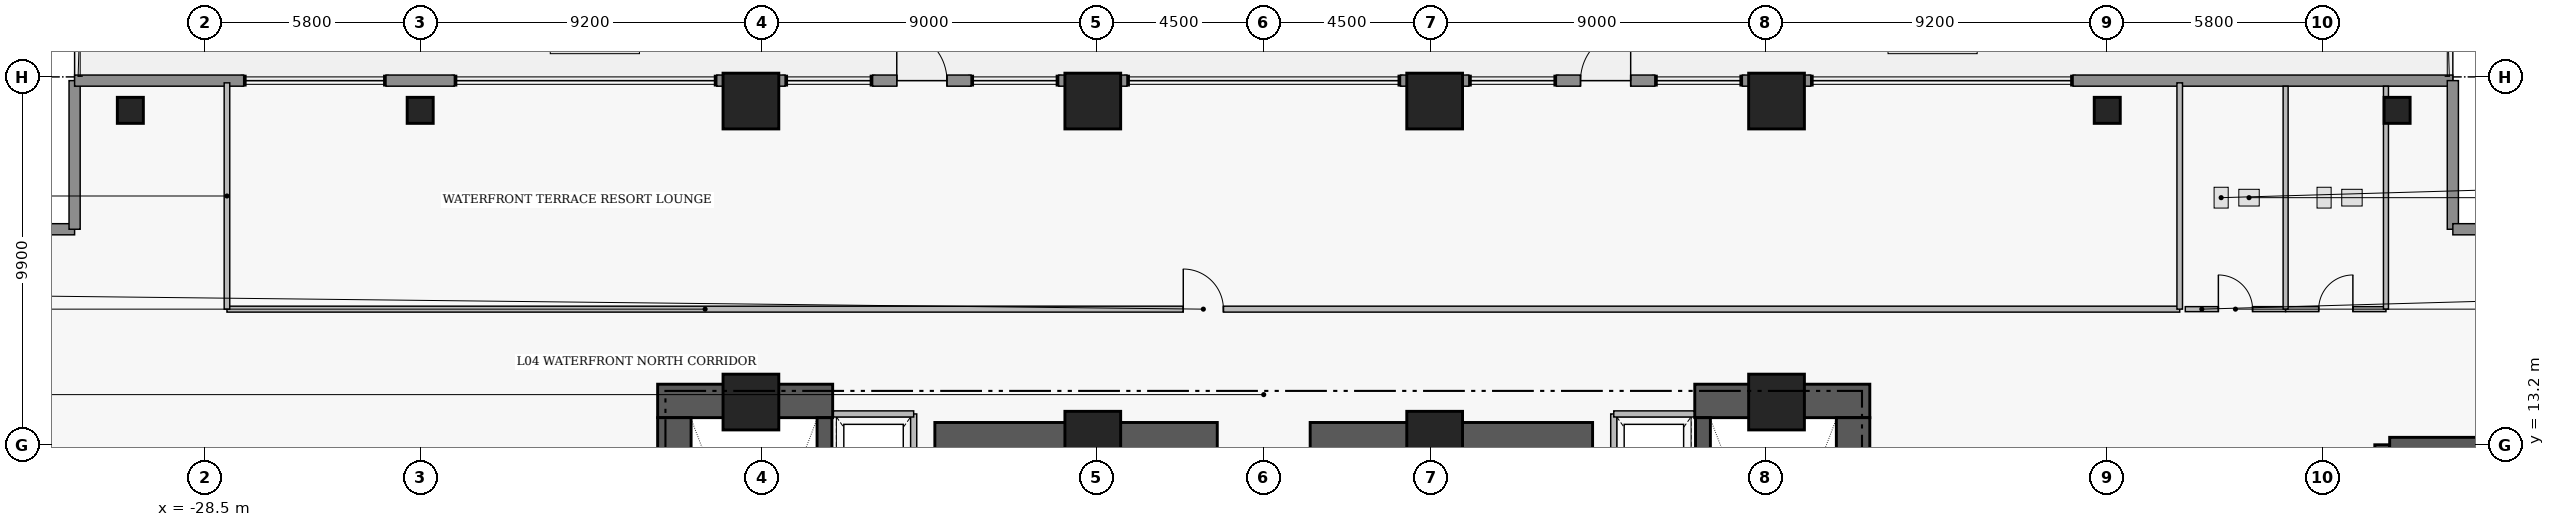
"""IFC4 building model, lengths in metres.
Left out: names, types, materials, properties, quantities, classifications, styles, units other than length and angle.
Written with IfcOpenShell. Run it as: python <this file> out.ifc"""

import sys

from ifc_helpers import new_model, si_unit, direction, frame, frame_2d, origin, origin_2d, place, context, subcontext, project, spatial, rectangle, extrude, element, fill, save


model = new_model("IFC4")
c1 = context("Model", 3, precision=1e-05, world=origin(), true_north=direction((0.0, 1.0)))
c2 = subcontext(c1, "Body", "Model", "MODEL_VIEW")
j1 = project(units=[si_unit("LENGTHUNIT", "METRE"), si_unit("PLANEANGLEUNIT", "RADIAN")], contexts=[c1])
p1 = place(None, origin())
s1 = spatial("IfcSite", under=j1, at=p1, CompositionType="ELEMENT")
p2 = place(p1, origin())
s2 = spatial("IfcBuilding", under=s1, at=p2, CompositionType="ELEMENT")
p3 = place(p2, frame((0.0, 0.0, 22.8)))
s3 = spatial("IfcBuildingStorey", under=s2, at=p3, CompositionType="ELEMENT", Elevation=22.8)
for number, where, z_axis, x_axis in (
    (1, (-16.31, 14.38, 0.0), (0.0, 0.0, 1.0), (1.0, 0.0, 0.0)),
    (2, (11.6, 14.38, 0.0), (0.0, 0.0, 1.0), (1.0, 0.0, 0.0)),
):
    element("IfcWall", number, at=place(p3, frame(where, z_axis=z_axis, x_axis=x_axis)), inside=s3, PredefinedType="SHEAR", context=c2, shape_type="SweptSolid", body=[
        extrude(rectangle(XDim=4.71, YDim=0.9, at=frame_2d((2.355, 0.0))), origin(), (0.0, 0.0, 1.0), 4.61),
    ])
for number, where, z_axis, x_axis in (
    (3, (-15.86, 4.97, 0.0), (0.0, 0.0, 1.0), (0.0, 1.0, 0.0)),
    (4, (15.86, 4.97, 0.0), (0.0, 0.0, 1.0), (0.0, 1.0, 0.0)),
):
    element("IfcWall", number, at=place(p3, frame(where, z_axis=z_axis, x_axis=x_axis)), inside=s3, PredefinedType="SHEAR", context=c2, shape_type="SweptSolid", body=[
        extrude(rectangle(XDim=8.96, YDim=0.9, at=frame_2d((4.48, 0.0))), origin(), (0.0, 0.0, 1.0), 4.61),
    ])
for number, where, z_axis, x_axis in (
    (5, (-8.85, 13.35, 0.0), (0.0, 0.0, 1.0), (1.0, 0.0, 0.0)),
    (6, (1.25, 13.35, 0.0), (0.0, 0.0, 1.0), (1.0, 0.0, 0.0)),
):
    element("IfcWall", number, at=place(p3, frame(where, z_axis=z_axis, x_axis=x_axis)), inside=s3, PredefinedType="SHEAR", context=c2, shape_type="SweptSolid", body=[
        extrude(rectangle(XDim=7.6, YDim=0.9, at=frame_2d((3.8, 0.0))), origin(), (0.0, 0.0, 1.0), 4.58),
    ])
p4 = place(p3, frame((-11.82, 4.97, 0.0), z_axis=(0.0, 0.0, 1.0), x_axis=(0.0, 1.0, 0.0)))
e7 = element("IfcWall", 7, at=p4, inside=s3, PredefinedType="SHEAR", context=c2, shape_type="SweptSolid", body=[
    extrude(rectangle(XDim=8.96, YDim=0.4, at=frame_2d((4.48, 0.0))), origin(), (0.0, 0.0, 1.0), 4.61),
])
p5 = place(p4, frame((0.31, 0.0, 0.0)))
e8 = element("IfcOpeningElement", 8, at=p5, cuts=e7, PredefinedType="OPENING", context=c2, shape_type="SweptSolid", body=[
    extrude(rectangle(XDim=1.12, YDim=2.22, at=frame_2d((0.56, 1.11))), frame((0.0, 0.21, 0.0), z_axis=(0.0, -1.0, 0.0), x_axis=(1.0, 0.0, 0.0)), (0.0, 0.0, 1.0), 0.42),
])
p6 = place(p3, frame((11.82, 13.93, 0.0), z_axis=(0.0, 0.0, 1.0), x_axis=(0.0, -1.0, 0.0)))
e9 = element("IfcWall", 9, at=p6, inside=s3, PredefinedType="SHEAR", context=c2, shape_type="SweptSolid", body=[
    extrude(rectangle(XDim=8.96, YDim=0.4, at=frame_2d((4.48, 0.0))), origin(), (0.0, 0.0, 1.0), 4.61),
])
p7 = place(p6, frame((7.53, 0.0, 0.0)))
e10 = element("IfcOpeningElement", 10, at=p7, cuts=e9, PredefinedType="OPENING", context=c2, shape_type="SweptSolid", body=[
    extrude(rectangle(XDim=1.12, YDim=2.22, at=frame_2d((0.56, 1.11))), frame((0.0, 0.21, 0.0), z_axis=(0.0, -1.0, 0.0), x_axis=(1.0, 0.0, 0.0)), (0.0, 0.0, 1.0), 0.42),
])
p8 = place(p3, frame((30.1, 13.2, 0.0), z_axis=(0.0, 0.0, 1.0), x_axis=(0.0, -1.0, 0.0)))
e11 = element("IfcWall", 11, at=p8, inside=s3, PredefinedType="SHEAR", context=c2, shape_type="SweptSolid", body=[
    extrude(rectangle(XDim=11.8, YDim=0.4, at=frame_2d((5.9, 0.0))), origin(), (0.0, 0.0, 1.0), 4.61),
])
p9 = place(p8, frame((9.7, 0.0, 0.0)))
e12 = element("IfcOpeningElement", 12, at=p9, cuts=e11, PredefinedType="OPENING", context=c2, shape_type="SweptSolid", body=[
    extrude(rectangle(XDim=1.12, YDim=2.22, at=frame_2d((0.56, 1.11))), frame((0.0, 0.21, 0.0), z_axis=(0.0, -1.0, 0.0), x_axis=(1.0, 0.0, 0.0)), (0.0, 0.0, 1.0), 0.42),
])
p10 = place(p3, frame((30.3, 13.2, 0.0), z_axis=(0.0, 0.0, 1.0), x_axis=(1.0, 0.0, 0.0)))
e13 = element("IfcWall", 13, at=p10, inside=s3, PredefinedType="SHEAR", context=c2, shape_type="SweptSolid", body=[
    extrude(rectangle(XDim=5.35, YDim=0.4, at=frame_2d((2.675, 0.0))), origin(), (0.0, 0.0, 1.0), 4.61),
])
for number, where, z_axis, x_axis in (
    (14, (-13.8, 14.35, 0.0), (0.0, 0.0, 1.0), (1.0, 0.0, 0.0)),
    (15, (-4.6, 13.35, 0.0), (0.0, 0.0, 1.0), (1.0, 0.0, 0.0)),
    (16, (4.6, 13.35, 0.0), (0.0, 0.0, 1.0), (1.0, 0.0, 0.0)),
    (17, (13.8, 14.35, 0.0), (0.0, 0.0, 1.0), (1.0, 0.0, 0.0)),
    (18, (-13.8, 22.45, 0.0), (0.0, 0.0, 1.0), (1.0, 0.0, 0.0)),
    (19, (-4.6, 22.45, 0.0), (0.0, 0.0, 1.0), (1.0, 0.0, 0.0)),
    (20, (4.6, 22.45, 0.0), (0.0, 0.0, 1.0), (1.0, 0.0, 0.0)),
    (21, (13.8, 22.45, 0.0), (0.0, 0.0, 1.0), (1.0, 0.0, 0.0)),
):
    element("IfcColumn", number, at=place(p3, frame(where, z_axis=z_axis, x_axis=x_axis)), inside=s3, PredefinedType="COLUMN", context=c2, shape_type="SweptSolid", body=[
        extrude(rectangle(XDim=1.5, YDim=1.5, at=origin_2d()), origin(), (0.0, 0.0, 1.0), 4.8),
    ])
for number, where, z_axis, x_axis in (
    (22, (-30.5, 22.2, 0.0), (0.0, 0.0, 1.0), (1.0, 0.0, 0.0)),
    (23, (30.5, 22.2, 0.0), (0.0, 0.0, 1.0), (1.0, 0.0, 0.0)),
    (24, (-22.7, 22.2, 0.0), (0.0, 0.0, 1.0), (1.0, 0.0, 0.0)),
    (25, (22.7, 22.2, 0.0), (0.0, 0.0, 1.0), (1.0, 0.0, 0.0)),
):
    element("IfcColumn", number, at=place(p3, frame(where, z_axis=z_axis, x_axis=x_axis)), inside=s3, PredefinedType="COLUMN", context=c2, shape_type="SweptSolid", body=[
        extrude(rectangle(XDim=0.7, YDim=0.7, at=origin_2d()), origin(), (0.0, 0.0, 1.0), 4.8),
    ])
for number, where, z_axis, x_axis in (
    (26, (-36.0, 19.0, 0.0), (0.0, 0.0, 1.0), (1.0, 0.0, 0.0)),
    (27, (-32.0, 19.0, 0.0), (0.0, 0.0, 1.0), (0.0, 1.0, 0.0)),
):
    element("IfcWall", number, at=place(p3, frame(where, z_axis=z_axis, x_axis=x_axis)), inside=s3, PredefinedType="STANDARD", context=c2, shape_type="SweptSolid", body=[
        extrude(rectangle(XDim=4.0, YDim=0.3, at=frame_2d((2.0, 0.0))), origin(), (0.0, 0.0, 1.0), 4.58),
    ])
p11 = place(p3, frame((-32.0, 23.0, 0.0), z_axis=(0.0, 0.0, 1.0), x_axis=(1.0, 0.0, 0.0)))
e28 = element("IfcWall", 28, at=p11, inside=s3, PredefinedType="STANDARD", context=c2, shape_type="SweptSolid", body=[
    extrude(rectangle(XDim=4.55, YDim=0.3, at=frame_2d((2.275, 0.0))), origin(), (0.0, 0.0, 1.0), 4.58),
])
for number, where, z_axis, x_axis in (
    (29, (-23.62, 23.0, 0.0), (0.0, 0.0, 1.0), (1.0, 0.0, 0.0)),
    (30, (-14.72, 23.0, 0.0), (0.0, 0.0, 1.0), (1.0, 0.0, 0.0)),
):
    element("IfcWall", number, at=place(p3, frame(where, z_axis=z_axis, x_axis=x_axis)), inside=s3, PredefinedType="STANDARD", context=c2, shape_type="SweptSolid", body=[
        extrude(rectangle(XDim=1.84, YDim=0.3, at=frame_2d((0.92, 0.0))), origin(), (0.0, 0.0, 1.0), 4.58),
    ])
p12 = place(p3, frame((-10.525, 23.0, 0.0), z_axis=(0.0, 0.0, 1.0), x_axis=(1.0, 0.0, 0.0)))
e31 = element("IfcWall", 31, at=p12, inside=s3, PredefinedType="STANDARD", context=c2, shape_type="SweptSolid", body=[
    extrude(rectangle(XDim=2.65, YDim=0.3, at=frame_2d((1.325, 0.0))), origin(), (0.0, 0.0, 1.0), 4.58),
])
p13 = place(p12, frame((0.65, 0.0, 0.0)))
e32 = element("IfcOpeningElement", 32, at=p13, cuts=e31, PredefinedType="OPENING", context=c2, shape_type="SweptSolid", body=[
    extrude(rectangle(XDim=1.35, YDim=2.3, at=frame_2d((0.675, 1.15))), frame((0.0, 0.16, 0.0), z_axis=(0.0, -1.0, 0.0), x_axis=(1.0, 0.0, 0.0)), (0.0, 0.0, 1.0), 0.32),
])
for number, where, z_axis, x_axis in (
    (33, (-5.52, 23.0, 0.0), (0.0, 0.0, 1.0), (1.0, 0.0, 0.0)),
    (34, (3.68, 23.0, 0.0), (0.0, 0.0, 1.0), (1.0, 0.0, 0.0)),
):
    element("IfcWall", number, at=place(p3, frame(where, z_axis=z_axis, x_axis=x_axis)), inside=s3, PredefinedType="STANDARD", context=c2, shape_type="SweptSolid", body=[
        extrude(rectangle(XDim=1.84, YDim=0.3, at=frame_2d((0.92, 0.0))), origin(), (0.0, 0.0, 1.0), 4.58),
    ])
p14 = place(p3, frame((7.875, 23.0, 0.0), z_axis=(0.0, 0.0, 1.0), x_axis=(1.0, 0.0, 0.0)))
e35 = element("IfcWall", 35, at=p14, inside=s3, PredefinedType="STANDARD", context=c2, shape_type="SweptSolid", body=[
    extrude(rectangle(XDim=2.65, YDim=0.3, at=frame_2d((1.325, 0.0))), origin(), (0.0, 0.0, 1.0), 4.58),
])
p15 = place(p14, frame((0.65, 0.0, 0.0)))
e36 = element("IfcOpeningElement", 36, at=p15, cuts=e35, PredefinedType="OPENING", context=c2, shape_type="SweptSolid", body=[
    extrude(rectangle(XDim=1.35, YDim=2.3, at=frame_2d((0.675, 1.15))), frame((0.0, 0.16, 0.0), z_axis=(0.0, -1.0, 0.0), x_axis=(1.0, 0.0, 0.0)), (0.0, 0.0, 1.0), 0.32),
])
p16 = place(p3, frame((12.88, 23.0, 0.0), z_axis=(0.0, 0.0, 1.0), x_axis=(1.0, 0.0, 0.0)))
e37 = element("IfcWall", 37, at=p16, inside=s3, PredefinedType="STANDARD", context=c2, shape_type="SweptSolid", body=[
    extrude(rectangle(XDim=1.84, YDim=0.3, at=frame_2d((0.92, 0.0))), origin(), (0.0, 0.0, 1.0), 4.58),
])
p17 = place(p3, frame((21.78, 23.0, 0.0), z_axis=(0.0, 0.0, 1.0), x_axis=(1.0, 0.0, 0.0)))
e38 = element("IfcWall", 38, at=p17, inside=s3, PredefinedType="STANDARD", context=c2, shape_type="SweptSolid", body=[
    extrude(rectangle(XDim=10.22, YDim=0.3, at=frame_2d((5.11, 0.0))), origin(), (0.0, 0.0, 1.0), 4.58),
])
for number, where, z_axis, x_axis in (
    (39, (32.0, 23.0, 0.0), (0.0, 0.0, 1.0), (0.0, -1.0, 0.0)),
    (40, (32.0, 19.0, 0.0), (0.0, 0.0, 1.0), (1.0, 0.0, 0.0)),
):
    element("IfcWall", number, at=place(p3, frame(where, z_axis=z_axis, x_axis=x_axis)), inside=s3, PredefinedType="STANDARD", context=c2, shape_type="SweptSolid", body=[
        extrude(rectangle(XDim=4.0, YDim=0.3, at=frame_2d((2.0, 0.0))), origin(), (0.0, 0.0, 1.0), 4.58),
    ])
p18 = place(p3, frame((-27.9, 16.85, 0.0), z_axis=(0.0, 0.0, 1.0), x_axis=(1.0, 0.0, 0.0)))
e41 = element("IfcWall", 41, at=p18, inside=s3, PredefinedType="PARTITIONING", context=c2, shape_type="SweptSolid", body=[
    extrude(rectangle(XDim=52.55, YDim=0.16, at=frame_2d((26.275, 0.0))), origin(), (0.0, 0.0, 1.0), 4.123),
])
p19 = place(p18, frame((25.735, 0.0, 0.0)))
e42 = element("IfcOpeningElement", 42, at=p19, cuts=e41, PredefinedType="OPENING", context=c2, shape_type="SweptSolid", body=[
    extrude(rectangle(XDim=1.08, YDim=2.18, at=frame_2d((0.54, 1.09))), frame((0.0, 0.09, 0.0), z_axis=(0.0, -1.0, 0.0), x_axis=(1.0, 0.0, 0.0)), (0.0, 0.0, 1.0), 0.18),
])
p20 = place(p3, frame((24.8, 16.85, 0.0), z_axis=(0.0, 0.0, 1.0), x_axis=(1.0, 0.0, 0.0)))
e43 = element("IfcWall", 43, at=p20, inside=s3, PredefinedType="PLUMBINGWALL", context=c2, shape_type="SweptSolid", body=[
    extrude(rectangle(XDim=2.7, YDim=0.135, at=frame_2d((1.35, 0.0))), origin(), (0.0, 0.0, 1.0), 4.58),
])
p21 = place(p20, frame((0.89, 0.0, 0.0)))
e44 = element("IfcOpeningElement", 44, at=p21, cuts=e43, PredefinedType="OPENING", context=c2, shape_type="SweptSolid", body=[
    extrude(rectangle(XDim=0.92, YDim=2.12, at=frame_2d((0.46, 1.06))), frame((0.0, 0.077, 0.0), z_axis=(0.0, -1.0, 0.0), x_axis=(1.0, 0.0, 0.0)), (0.0, 0.0, 1.0), 0.155),
])
p22 = place(p3, frame((27.5, 16.85, 0.0), z_axis=(0.0, 0.0, 1.0), x_axis=(1.0, 0.0, 0.0)))
e45 = element("IfcWall", 45, at=p22, inside=s3, PredefinedType="PLUMBINGWALL", context=c2, shape_type="SweptSolid", body=[
    extrude(rectangle(XDim=2.7, YDim=0.135, at=frame_2d((1.35, 0.0))), origin(), (0.0, 0.0, 1.0), 4.58),
])
p23 = place(p22, frame((0.89, 0.0, 0.0)))
e46 = element("IfcOpeningElement", 46, at=p23, cuts=e45, PredefinedType="OPENING", context=c2, shape_type="SweptSolid", body=[
    extrude(rectangle(XDim=0.92, YDim=2.12, at=frame_2d((0.46, 1.06))), frame((0.0, 0.077, 0.0), z_axis=(0.0, -1.0, 0.0), x_axis=(1.0, 0.0, 0.0)), (0.0, 0.0, 1.0), 0.155),
])
p24 = place(p3, frame((-9.42, 11.07, 0.0), z_axis=(0.0, 0.0, 1.0), x_axis=(0.0, 1.0, 0.0)))
e47 = element("IfcWall", 47, at=p24, inside=s3, PredefinedType="PARTITIONING", context=c2, shape_type="SweptSolid", body=[
    extrude(rectangle(XDim=2.96, YDim=0.165, at=frame_2d((1.48, 0.0))), origin(), (0.0, 0.0, 1.0), 4.58),
])
p25 = place(p3, frame((-11.58, 14.03, 0.0), z_axis=(0.0, 0.0, 1.0), x_axis=(1.0, 0.0, 0.0)))
e48 = element("IfcWall", 48, at=p25, inside=s3, PredefinedType="PARTITIONING", context=c2, shape_type="SweptSolid", body=[
    extrude(rectangle(XDim=2.16, YDim=0.165, at=frame_2d((1.08, 0.0))), origin(), (0.0, 0.0, 1.0), 4.58),
])
p26 = place(p3, frame((9.42, 11.07, 0.0), z_axis=(0.0, 0.0, 1.0), x_axis=(0.0, 1.0, 0.0)))
e49 = element("IfcWall", 49, at=p26, inside=s3, PredefinedType="PARTITIONING", context=c2, shape_type="SweptSolid", body=[
    extrude(rectangle(XDim=2.96, YDim=0.165, at=frame_2d((1.48, 0.0))), origin(), (0.0, 0.0, 1.0), 4.58),
])
p27 = place(p3, frame((9.42, 14.03, 0.0), z_axis=(0.0, 0.0, 1.0), x_axis=(1.0, 0.0, 0.0)))
e50 = element("IfcWall", 50, at=p27, inside=s3, PredefinedType="PARTITIONING", context=c2, shape_type="SweptSolid", body=[
    extrude(rectangle(XDim=2.16, YDim=0.165, at=frame_2d((1.08, 0.0))), origin(), (0.0, 0.0, 1.0), 4.58),
])
for number, where, z_axis, x_axis in (
    (51, (-27.9, 16.85, 0.0), (0.0, 0.0, 1.0), (0.0, 1.0, 0.0)),
    (52, (24.65, 16.85, 0.0), (0.0, 0.0, 1.0), (0.0, 1.0, 0.0)),
):
    element("IfcWall", number, at=place(p3, frame(where, z_axis=z_axis, x_axis=x_axis)), inside=s3, PredefinedType="PARTITIONING", context=c2, shape_type="SweptSolid", body=[
        extrude(rectangle(XDim=6.09, YDim=0.15, at=frame_2d((3.045, 0.0))), origin(), (0.0, 0.0, 1.0), 4.58),
    ])
for number, where, z_axis, x_axis in (
    (53, (30.2, 16.85, 0.0), (0.0, 0.0, 1.0), (0.0, 1.0, 0.0)),
    (54, (27.5, 16.85, 0.0), (0.0, 0.0, 1.0), (0.0, 1.0, 0.0)),
):
    element("IfcWall", number, at=place(p3, frame(where, z_axis=z_axis, x_axis=x_axis)), inside=s3, PredefinedType="PLUMBINGWALL", context=c2, shape_type="SweptSolid", body=[
        extrude(rectangle(XDim=6.0, YDim=0.135, at=frame_2d((3.0, 0.0))), origin(), (0.0, 0.0, 1.0), 4.58),
    ])
p28 = place(p13, origin())
e55 = element("IfcDoor", 55, at=p28, inside=s3, OperationType="SINGLE_SWING_LEFT", PredefinedType="DOOR", context=c2, shape_type="SweptSolid", body=[
    extrude(rectangle(XDim=1.35, YDim=2.3, at=frame_2d((0.675, 1.15))), frame((0.0, 0.025, 0.0), z_axis=(0.0, -1.0, 0.0), x_axis=(1.0, 0.0, 0.0)), (0.0, 0.0, 1.0), 0.05),
])
fill(e32, e55)
p29 = place(p15, origin())
e56 = element("IfcDoor", 56, at=p29, inside=s3, OperationType="SINGLE_SWING_RIGHT", PredefinedType="DOOR", context=c2, shape_type="SweptSolid", body=[
    extrude(rectangle(XDim=1.35, YDim=2.3, at=frame_2d((0.675, 1.15))), frame((0.0, 0.025, 0.0), z_axis=(0.0, -1.0, 0.0), x_axis=(1.0, 0.0, 0.0)), (0.0, 0.0, 1.0), 0.05),
])
fill(e36, e56)
p30 = place(p19, origin())
e57 = element("IfcDoor", 57, at=p30, inside=s3, OperationType="SINGLE_SWING_LEFT", PredefinedType="DOOR", context=c2, shape_type="SweptSolid", body=[
    extrude(rectangle(XDim=1.08, YDim=2.18, at=frame_2d((0.54, 1.09))), frame((0.0, 0.025, 0.0), z_axis=(0.0, -1.0, 0.0), x_axis=(1.0, 0.0, 0.0)), (0.0, 0.0, 1.0), 0.05),
])
fill(e42, e57)
p31 = place(p21, origin())
e58 = element("IfcDoor", 58, at=p31, inside=s3, OperationType="SINGLE_SWING_LEFT", PredefinedType="DOOR", context=c2, shape_type="SweptSolid", body=[
    extrude(rectangle(XDim=0.92, YDim=2.12, at=frame_2d((0.46, 1.06))), frame((0.0, 0.025, 0.0), z_axis=(0.0, -1.0, 0.0), x_axis=(1.0, 0.0, 0.0)), (0.0, 0.0, 1.0), 0.05),
])
fill(e44, e58)
p32 = place(p23, origin())
e59 = element("IfcDoor", 59, at=p32, inside=s3, OperationType="SINGLE_SWING_RIGHT", PredefinedType="DOOR", context=c2, shape_type="SweptSolid", body=[
    extrude(rectangle(XDim=0.92, YDim=2.12, at=frame_2d((0.46, 1.06))), frame((0.0, 0.025, 0.0), z_axis=(0.0, -1.0, 0.0), x_axis=(1.0, 0.0, 0.0)), (0.0, 0.0, 1.0), 0.05),
])
fill(e46, e59)
save(model, sys.argv[1])
